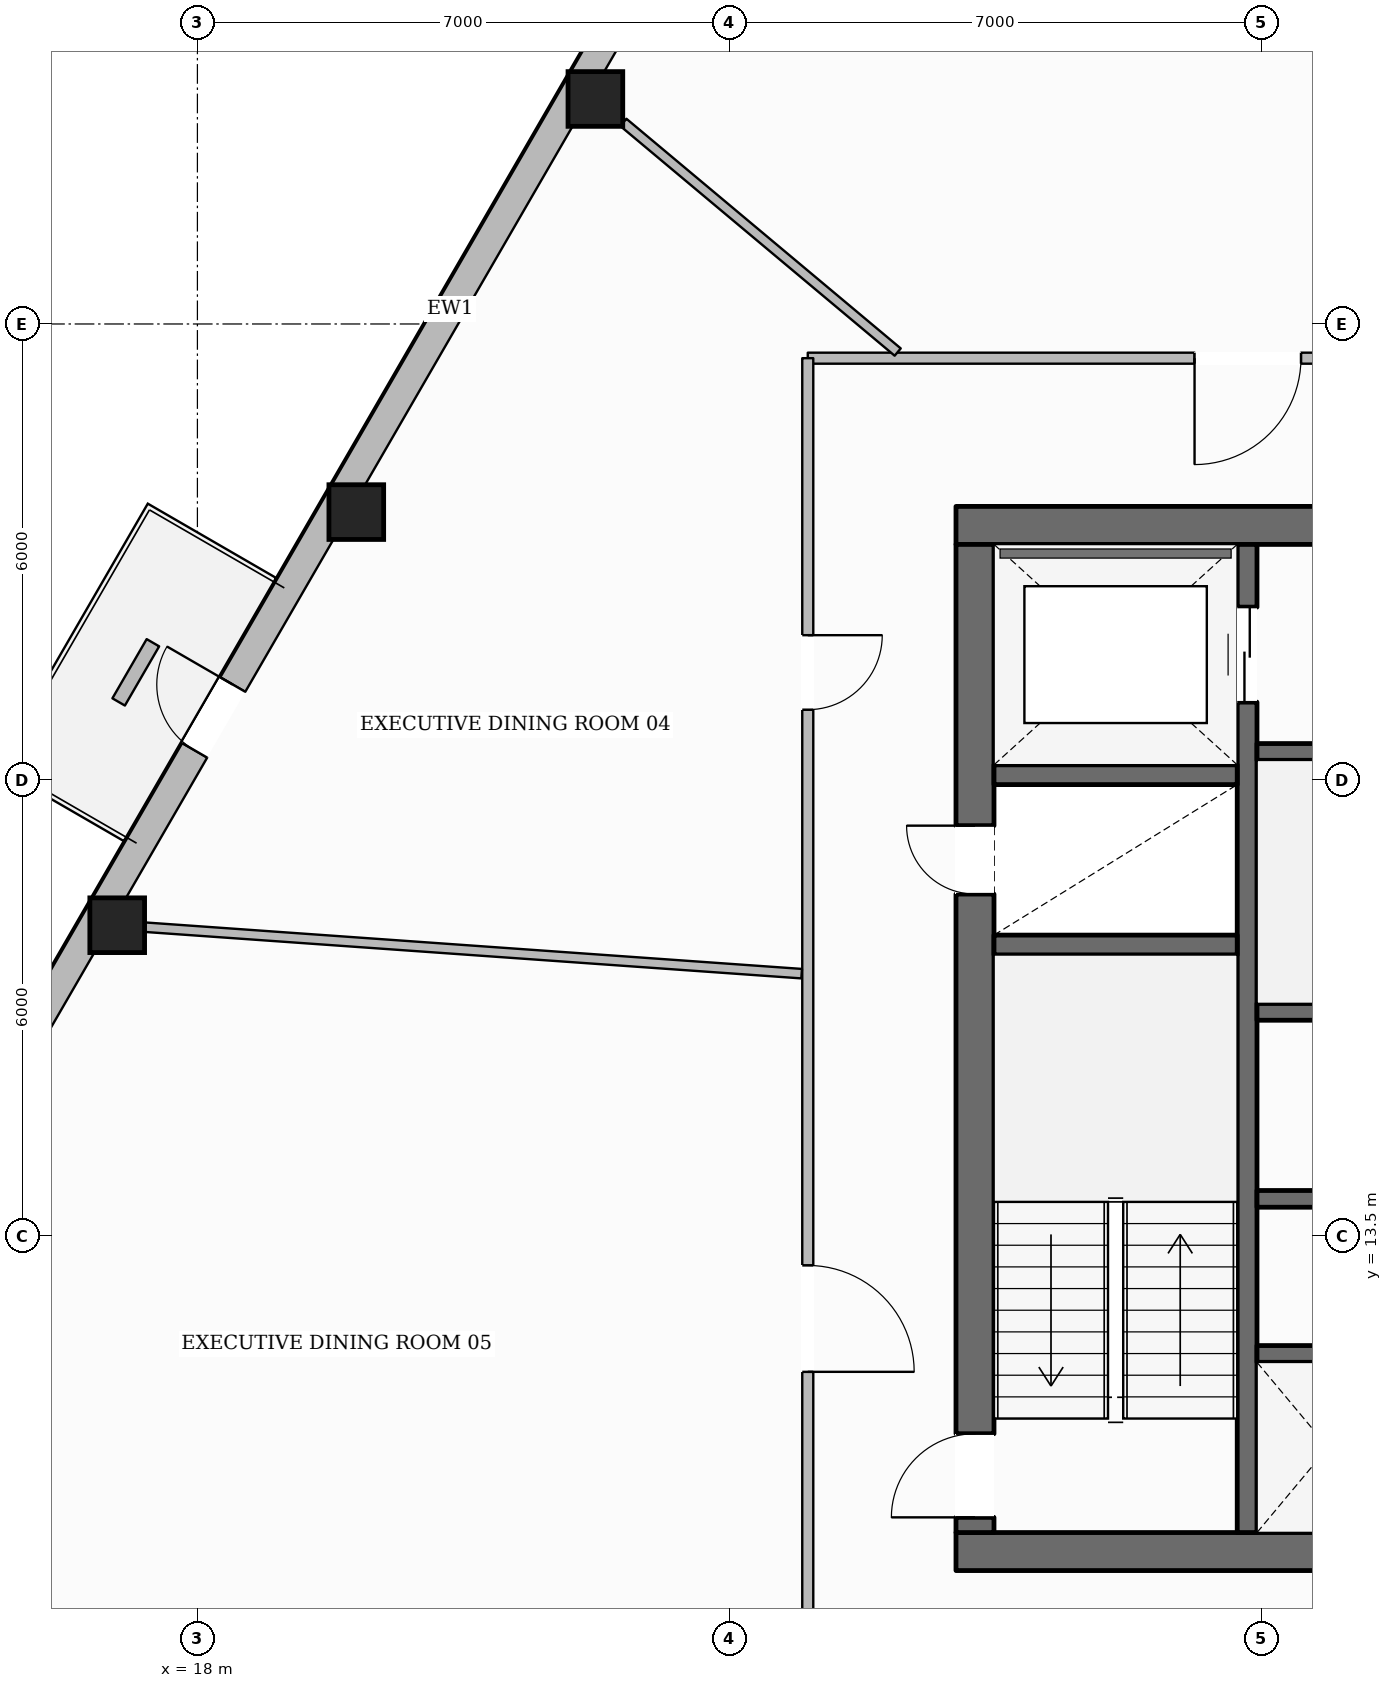
"""IFC4 building model, lengths in metres.
Left out: names, types, materials, properties, quantities, classifications, styles, units other than length and angle.
Written with IfcOpenShell. Run it as: python <this file> out.ifc"""

import sys

from ifc_helpers import new_model, si_unit, direction, frame, frame_2d, origin, origin_2d, place, context, subcontext, project, spatial, rectangle, hollow_rectangle, extrude, element, fill, save


model = new_model("IFC4")
c1 = context("Model", 3, precision=1e-05, world=origin(), true_north=direction((0.0, 1.0)))
c2 = subcontext(c1, "Body", "Model", "MODEL_VIEW")
j1 = project(units=[si_unit("LENGTHUNIT", "METRE"), si_unit("PLANEANGLEUNIT", "RADIAN")], contexts=[c1])
p1 = place(None, origin())
s1 = spatial("IfcSite", under=j1, at=p1, CompositionType="ELEMENT")
p2 = place(p1, origin())
s2 = spatial("IfcBuilding", under=s1, at=p2, CompositionType="ELEMENT")
p3 = place(p2, frame((0.0, 0.0, 150.95)))
s3 = spatial("IfcBuildingStorey", under=s2, at=p3, CompositionType="ELEMENT", Elevation=150.95)
p4 = place(p3, frame((27.98, 9.35, 0.0), z_axis=(0.0, 0.0, 1.0), x_axis=(1.0, 0.0, 0.0)))
e1 = element("IfcWall", 1, at=p4, inside=s3, PredefinedType="SOLIDWALL", context=c2, shape_type="SweptSolid", body=[
    extrude(rectangle(XDim=20.04, YDim=0.5, at=frame_2d((10.02, 0.0))), origin(), (0.0, 0.0, 1.0), 3.43),
])
p5 = place(p4, frame((10.52, 0.0, 0.0)))
e2 = element("IfcOpeningElement", 2, at=p5, cuts=e1, PredefinedType="OPENING", context=c2, shape_type="SweptSolid", body=[
    extrude(rectangle(XDim=1.4, YDim=2.2, at=frame_2d((0.7, 1.1))), frame((0.0, 0.26, 0.0), z_axis=(0.0, -1.0, 0.0), x_axis=(1.0, 0.0, 0.0)), (0.0, 0.0, 1.0), 0.52),
])
p6 = place(p3, frame((27.98, 22.85, 0.0), z_axis=(0.0, 0.0, 1.0), x_axis=(1.0, 0.0, 0.0)))
e3 = element("IfcWall", 3, at=p6, inside=s3, PredefinedType="SOLIDWALL", context=c2, shape_type="SweptSolid", body=[
    extrude(rectangle(XDim=20.04, YDim=0.5, at=frame_2d((10.02, 0.0))), origin(), (0.0, 0.0, 1.0), 3.43),
])
p7 = place(p6, frame((6.295, 0.0, 0.0)))
e4 = element("IfcOpeningElement", 4, at=p7, cuts=e3, PredefinedType="OPENING", context=c2, shape_type="SweptSolid", body=[
    extrude(rectangle(XDim=1.05, YDim=2.15, at=frame_2d((0.525, 1.075))), frame((0.0, 0.26, 0.0), z_axis=(0.0, -1.0, 0.0), x_axis=(1.0, 0.0, 0.0)), (0.0, 0.0, 1.0), 0.52),
])
p8 = place(p6, frame((12.695, 0.0, 0.0)))
e5 = element("IfcOpeningElement", 5, at=p8, cuts=e3, PredefinedType="OPENING", context=c2, shape_type="SweptSolid", body=[
    extrude(rectangle(XDim=1.05, YDim=2.15, at=frame_2d((0.525, 1.075))), frame((0.0, 0.26, 0.0), z_axis=(0.0, -1.0, 0.0), x_axis=(1.0, 0.0, 0.0)), (0.0, 0.0, 1.0), 0.52),
])
p9 = place(p3, frame((28.23, 9.6, 0.0), z_axis=(0.0, 0.0, 1.0), x_axis=(0.0, 1.0, 0.0)))
e6 = element("IfcWall", 6, at=p9, inside=s3, PredefinedType="SOLIDWALL", context=c2, shape_type="SweptSolid", body=[
    extrude(rectangle(XDim=13.0, YDim=0.5, at=frame_2d((6.5, 0.0))), origin(), (0.0, 0.0, 1.0), 3.43),
])
p10 = place(p9, frame((0.2, 0.0, 0.0)))
e7 = element("IfcOpeningElement", 7, at=p10, cuts=e6, PredefinedType="OPENING", context=c2, shape_type="SweptSolid", body=[
    extrude(rectangle(XDim=1.1, YDim=2.15, at=frame_2d((0.55, 1.075))), frame((0.0, 0.26, 0.0), z_axis=(0.0, -1.0, 0.0), x_axis=(1.0, 0.0, 0.0)), (0.0, 0.0, 1.0), 0.52),
])
p11 = place(p9, frame((8.4, 0.0, 0.0)))
e8 = element("IfcOpeningElement", 8, at=p11, cuts=e6, PredefinedType="OPENING", context=c2, shape_type="SweptSolid", body=[
    extrude(rectangle(XDim=0.9, YDim=2.1, at=frame_2d((0.45, 1.05))), frame((0.0, 0.26, 0.0), z_axis=(0.0, -1.0, 0.0), x_axis=(1.0, 0.0, 0.0)), (0.0, 0.0, 1.0), 0.52),
])
p12 = place(p3, frame((31.81, 9.6, 0.0), z_axis=(0.0, 0.0, 1.0), x_axis=(0.0, 1.0, 0.0)))
e9 = element("IfcWall", 9, at=p12, inside=s3, PredefinedType="SHEAR", context=c2, shape_type="SweptSolid", body=[
    extrude(rectangle(XDim=13.0, YDim=0.26, at=frame_2d((6.5, 0.0))), origin(), (0.0, 0.0, 1.0), 3.43),
])
p13 = place(p12, frame((10.925, 0.0, 0.0)))
e10 = element("IfcOpeningElement", 10, at=p13, cuts=e9, PredefinedType="OPENING", context=c2, shape_type="SweptSolid", body=[
    extrude(rectangle(XDim=1.25, YDim=2.25, at=frame_2d((0.625, 1.125))), frame((0.0, 0.14, 0.0), z_axis=(0.0, -1.0, 0.0), x_axis=(1.0, 0.0, 0.0)), (0.0, 0.0, 1.0), 0.28),
])
for number, where, z_axis, x_axis in (
    (11, (28.48, 17.33, 0.0), (0.0, 0.0, 1.0), (1.0, 0.0, 0.0)),
    (12, (28.48, 19.57, 0.0), (0.0, 0.0, 1.0), (1.0, 0.0, 0.0)),
):
    element("IfcWall", number, at=place(p3, frame(where, z_axis=z_axis, x_axis=x_axis)), inside=s3, PredefinedType="SHEAR", context=c2, shape_type="SweptSolid", body=[
        extrude(rectangle(XDim=3.2, YDim=0.26, at=frame_2d((1.6, 0.0))), origin(), (0.0, 0.0, 1.0), 3.43),
    ])
p14 = place(p3, frame((31.94, 19.87, 0.0), z_axis=(0.0, 0.0, 1.0), x_axis=(1.0, 0.0, 0.0)))
e13 = element("IfcWall", 13, at=p14, inside=s3, PredefinedType="SOLIDWALL", context=c2, shape_type="SweptSolid", body=[
    extrude(rectangle(XDim=12.12, YDim=0.22, at=frame_2d((6.06, 0.0))), origin(), (0.0, 0.0, 1.0), 3.43),
])
p15 = place(p14, frame((6.3, 0.0, 0.0)))
e14 = element("IfcOpeningElement", 14, at=p15, cuts=e13, PredefinedType="OPENING", context=c2, shape_type="SweptSolid", body=[
    extrude(rectangle(XDim=1.1, YDim=2.15, at=frame_2d((0.55, 1.075))), frame((0.0, 0.12, 0.0), z_axis=(0.0, -1.0, 0.0), x_axis=(1.0, 0.0, 0.0)), (0.0, 0.0, 1.0), 0.24),
])
p16 = place(p14, frame((8.01, 0.0, 0.0)))
e15 = element("IfcOpeningElement", 15, at=p16, cuts=e13, PredefinedType="OPENING", context=c2, shape_type="SweptSolid", body=[
    extrude(rectangle(XDim=0.9, YDim=2.1, at=frame_2d((0.45, 1.05))), frame((0.0, 0.12, 0.0), z_axis=(0.0, -1.0, 0.0), x_axis=(1.0, 0.0, 0.0)), (0.0, 0.0, 1.0), 0.24),
])
p17 = place(p14, frame((10.21, 0.0, 0.0)))
e16 = element("IfcOpeningElement", 16, at=p17, cuts=e13, PredefinedType="OPENING", context=c2, shape_type="SweptSolid", body=[
    extrude(rectangle(XDim=0.9, YDim=2.1, at=frame_2d((0.45, 1.05))), frame((0.0, 0.12, 0.0), z_axis=(0.0, -1.0, 0.0), x_axis=(1.0, 0.0, 0.0)), (0.0, 0.0, 1.0), 0.24),
])
p18 = place(p3, frame((31.94, 16.45, 0.0), z_axis=(0.0, 0.0, 1.0), x_axis=(1.0, 0.0, 0.0)))
e17 = element("IfcWall", 17, at=p18, inside=s3, PredefinedType="SOLIDWALL", context=c2, shape_type="SweptSolid", body=[
    extrude(rectangle(XDim=12.12, YDim=0.22, at=frame_2d((6.06, 0.0))), origin(), (0.0, 0.0, 1.0), 3.43),
])
p19 = place(p3, frame((31.94, 13.99, 0.0), z_axis=(0.0, 0.0, 1.0), x_axis=(1.0, 0.0, 0.0)))
e18 = element("IfcWall", 18, at=p19, inside=s3, PredefinedType="SOLIDWALL", context=c2, shape_type="SweptSolid", body=[
    extrude(rectangle(XDim=12.12, YDim=0.22, at=frame_2d((6.06, 0.0))), origin(), (0.0, 0.0, 1.0), 3.43),
])
p20 = place(p19, frame((2.51, 0.0, 0.0)))
e19 = element("IfcOpeningElement", 19, at=p20, cuts=e18, PredefinedType="OPENING", context=c2, shape_type="SweptSolid", body=[
    extrude(rectangle(XDim=0.9, YDim=2.1, at=frame_2d((0.45, 1.05))), frame((0.0, 0.12, 0.0), z_axis=(0.0, -1.0, 0.0), x_axis=(1.0, 0.0, 0.0)), (0.0, 0.0, 1.0), 0.24),
])
p21 = place(p19, frame((6.535, 0.0, 0.0)))
e20 = element("IfcOpeningElement", 20, at=p21, cuts=e18, PredefinedType="OPENING", context=c2, shape_type="SweptSolid", body=[
    extrude(rectangle(XDim=1.1, YDim=2.2, at=frame_2d((0.55, 1.1))), frame((0.0, 0.12, 0.0), z_axis=(0.0, -1.0, 0.0), x_axis=(1.0, 0.0, 0.0)), (0.0, 0.0, 1.0), 0.24),
])
p22 = place(p19, frame((8.585, 0.0, 0.0)))
e21 = element("IfcOpeningElement", 21, at=p22, cuts=e18, PredefinedType="OPENING", context=c2, shape_type="SweptSolid", body=[
    extrude(rectangle(XDim=1.1, YDim=2.2, at=frame_2d((0.55, 1.1))), frame((0.0, 0.12, 0.0), z_axis=(0.0, -1.0, 0.0), x_axis=(1.0, 0.0, 0.0)), (0.0, 0.0, 1.0), 0.24),
])
p23 = place(p19, frame((10.635, 0.0, 0.0)))
e22 = element("IfcOpeningElement", 22, at=p23, cuts=e18, PredefinedType="OPENING", context=c2, shape_type="SweptSolid", body=[
    extrude(rectangle(XDim=1.1, YDim=2.2, at=frame_2d((0.55, 1.1))), frame((0.0, 0.12, 0.0), z_axis=(0.0, -1.0, 0.0), x_axis=(1.0, 0.0, 0.0)), (0.0, 0.0, 1.0), 0.24),
])
p24 = place(p3, frame((31.94, 11.95, 0.0), z_axis=(0.0, 0.0, 1.0), x_axis=(1.0, 0.0, 0.0)))
e23 = element("IfcWall", 23, at=p24, inside=s3, PredefinedType="SOLIDWALL", context=c2, shape_type="SweptSolid", body=[
    extrude(rectangle(XDim=6.19, YDim=0.22, at=frame_2d((3.095, 0.0))), origin(), (0.0, 0.0, 1.0), 3.43),
])
for number, where, z_axis, x_axis in (
    (24, (23.236, 28.46, 0.0), (0.0, 0.0, 1.0), (1.0, 0.0, 0.0)),
    (25, (20.09, 23.025, 0.0), (0.0, 0.0, 1.0), (1.0, 0.0, 0.0)),
    (26, (16.945, 17.59, 0.0), (0.0, 0.0, 1.0), (1.0, 0.0, 0.0)),
):
    element("IfcColumn", number, at=place(p3, frame(where, z_axis=z_axis, x_axis=x_axis)), inside=s3, PredefinedType="COLUMN", context=c2, shape_type="SweptSolid", body=[
        extrude(hollow_rectangle(XDim=0.72, YDim=0.72, WallThickness=0.032, at=origin_2d()), origin(), (0.0, 0.0, 1.0), 3.43),
    ])
p25 = place(p3, frame((13.327, 11.879, 0.0), z_axis=(0.0, 0.0, 1.0), x_axis=(0.500913687278, 0.865497243148, 0.0)))
e27 = element("IfcWall", 27, at=p25, inside=s3, PredefinedType="STANDARD", context=c2, shape_type="SweptSolid", body=[
    extrude(rectangle(XDim=38.628, YDim=0.38, at=frame_2d((19.314, 0.0))), origin(), (0.0, 0.0, 1.0), 2.889),
])
p26 = place(p25, frame((9.257, 0.0, 0.0)))
e28 = element("IfcOpeningElement", 28, at=p26, cuts=e27, PredefinedType="OPENING", context=c2, shape_type="SweptSolid", body=[
    extrude(rectangle(XDim=1.0, YDim=2.2, at=frame_2d((0.5, 1.1))), frame((0.0, 0.2, 0.0), z_axis=(0.0, -1.0, 0.0), x_axis=(1.0, 0.0, 0.0)), (0.0, 0.0, 1.0), 0.4),
])
p27 = place(p25, frame((34.239, 0.0, 0.55)))
e29 = element("IfcOpeningElement", 29, at=p27, cuts=e27, PredefinedType="OPENING", context=c2, shape_type="SweptSolid", body=[
    extrude(rectangle(XDim=1.55, YDim=1.6, at=frame_2d((0.775, 0.8))), frame((0.0, 0.2, 0.0), z_axis=(0.0, -1.0, 0.0), x_axis=(1.0, 0.0, 0.0)), (0.0, 0.0, 1.0), 0.4),
])
p28 = place(p25, frame((27.959, 0.0, 0.55)))
e30 = element("IfcOpeningElement", 30, at=p28, cuts=e27, PredefinedType="OPENING", context=c2, shape_type="SweptSolid", body=[
    extrude(rectangle(XDim=1.55, YDim=1.6, at=frame_2d((0.775, 0.8))), frame((0.0, 0.2, 0.0), z_axis=(0.0, -1.0, 0.0), x_axis=(1.0, 0.0, 0.0)), (0.0, 0.0, 1.0), 0.4),
])
p29 = place(p25, frame((21.679, 0.0, 0.55)))
e31 = element("IfcOpeningElement", 31, at=p29, cuts=e27, PredefinedType="OPENING", context=c2, shape_type="SweptSolid", body=[
    extrude(rectangle(XDim=1.55, YDim=1.6, at=frame_2d((0.775, 0.8))), frame((0.0, 0.2, 0.0), z_axis=(0.0, -1.0, 0.0), x_axis=(1.0, 0.0, 0.0)), (0.0, 0.0, 1.0), 0.4),
])
p30 = place(p25, frame((2.84, 0.0, 0.55)))
e32 = element("IfcOpeningElement", 32, at=p30, cuts=e27, PredefinedType="OPENING", context=c2, shape_type="SweptSolid", body=[
    extrude(rectangle(XDim=1.55, YDim=1.6, at=frame_2d((0.775, 0.8))), frame((0.0, 0.2, 0.0), z_axis=(0.0, -1.0, 0.0), x_axis=(1.0, 0.0, 0.0)), (0.0, 0.0, 1.0), 0.4),
])
p31 = place(p3, frame((18.988, 2.486, 0.0), z_axis=(0.0, 0.0, 1.0), x_axis=(-0.494355320485, 0.869259924941, 0.0)))
e33 = element("IfcWall", 33, at=p31, inside=s3, PredefinedType="STANDARD", context=c2, shape_type="SweptSolid", body=[
    extrude(rectangle(XDim=11.446, YDim=0.3, at=frame_2d((5.723, 0.0))), origin(), (0.0, 0.0, 1.0), 2.889),
])
p32 = place(p31, frame((5.123, 0.0, 0.65)))
e34 = element("IfcOpeningElement", 34, at=p32, cuts=e33, PredefinedType="OPENING", context=c2, shape_type="SweptSolid", body=[
    extrude(rectangle(XDim=1.2, YDim=1.55, at=frame_2d((0.6, 0.775))), frame((0.0, 0.16, 0.0), z_axis=(0.0, -1.0, 0.0), x_axis=(1.0, 0.0, 0.0)), (0.0, 0.0, 1.0), 0.32),
])
p33 = place(p3, frame((17.415, 21.306, 0.0), z_axis=(0.0, 0.0, 1.0), x_axis=(-0.501068351936, -0.865407711248, 0.0)))
e35 = element("IfcWall", 35, at=p33, inside=s3, PredefinedType="USERDEFINED", context=c2, shape_type="SweptSolid", body=[
    extrude(rectangle(XDim=0.9, YDim=0.19, at=frame_2d((0.45, 0.0))), origin(), (0.0, 0.0, 1.0), 0.5),
])
p34 = place(p3, frame((49.97, 25.05, 0.0), z_axis=(0.0, 0.0, 1.0), x_axis=(-1.0, 0.0, 0.0)))
e36 = element("IfcWall", 36, at=p34, inside=s3, PredefinedType="PARTITIONING", context=c2, shape_type="SweptSolid", body=[
    extrude(rectangle(XDim=23.94, YDim=0.145, at=frame_2d((11.97, 0.0))), origin(), (0.0, 0.0, 1.0), 3.43),
])
p35 = place(p34, frame((2.536, 0.0, 0.0)))
e37 = element("IfcOpeningElement", 37, at=p35, cuts=e36, PredefinedType="OPENING", context=c2, shape_type="SweptSolid", body=[
    extrude(rectangle(XDim=0.98, YDim=2.15, at=frame_2d((0.49, 1.075))), frame((0.0, 0.083, 0.0), z_axis=(0.0, -1.0, 0.0), x_axis=(1.0, 0.0, 0.0)), (0.0, 0.0, 1.0), 0.165),
])
p36 = place(p34, frame((9.289, 0.0, 0.0)))
e38 = element("IfcOpeningElement", 38, at=p36, cuts=e36, PredefinedType="OPENING", context=c2, shape_type="SweptSolid", body=[
    extrude(rectangle(XDim=1.4, YDim=2.2, at=frame_2d((0.7, 1.1))), frame((0.0, 0.083, 0.0), z_axis=(0.0, -1.0, 0.0), x_axis=(1.0, 0.0, 0.0)), (0.0, 0.0, 1.0), 0.165),
])
p37 = place(p34, frame((17.451, 0.0, 0.0)))
e39 = element("IfcOpeningElement", 39, at=p37, cuts=e36, PredefinedType="OPENING", context=c2, shape_type="SweptSolid", body=[
    extrude(rectangle(XDim=1.4, YDim=2.2, at=frame_2d((0.7, 1.1))), frame((0.0, 0.083, 0.0), z_axis=(0.0, -1.0, 0.0), x_axis=(1.0, 0.0, 0.0)), (0.0, 0.0, 1.0), 0.165),
])
p38 = place(p3, frame((26.03, 25.05, 0.0), z_axis=(0.0, 0.0, 1.0), x_axis=(0.0, -1.0, 0.0)))
e40 = element("IfcWall", 40, at=p38, inside=s3, PredefinedType="PARTITIONING", context=c2, shape_type="SweptSolid", body=[
    extrude(rectangle(XDim=17.9, YDim=0.145, at=frame_2d((8.95, 0.0))), origin(), (0.0, 0.0, 1.0), 3.118),
])
p39 = place(p38, frame((3.644, 0.0, 0.0)))
e41 = element("IfcOpeningElement", 41, at=p39, cuts=e40, PredefinedType="OPENING", context=c2, shape_type="SweptSolid", body=[
    extrude(rectangle(XDim=0.98, YDim=2.15, at=frame_2d((0.49, 1.075))), frame((0.0, 0.083, 0.0), z_axis=(0.0, -1.0, 0.0), x_axis=(1.0, 0.0, 0.0)), (0.0, 0.0, 1.0), 0.165),
])
p40 = place(p38, frame((11.936, 0.0, 0.0)))
e42 = element("IfcOpeningElement", 42, at=p40, cuts=e40, PredefinedType="OPENING", context=c2, shape_type="SweptSolid", body=[
    extrude(rectangle(XDim=1.4, YDim=2.2, at=frame_2d((0.7, 1.1))), frame((0.0, 0.083, 0.0), z_axis=(0.0, -1.0, 0.0), x_axis=(1.0, 0.0, 0.0)), (0.0, 0.0, 1.0), 0.165),
])
p41 = place(p3, frame((36.322, 25.131, 0.0), z_axis=(0.0, 0.0, 1.0), x_axis=(-0.182723840281, 0.983164278335, 0.0)))
e43 = element("IfcWall", 43, at=p41, inside=s3, PredefinedType="PARTITIONING", context=c2, shape_type="SweptSolid", body=[
    extrude(rectangle(XDim=19.617, YDim=0.125, at=frame_2d((9.809, 0.0))), origin(), (0.0, 0.0, 1.0), 2.971),
])
p42 = place(p3, frame((27.213, 25.131, 0.0), z_axis=(0.0, 0.0, 1.0), x_axis=(-0.766769547329, 0.641922472958, 0.0)))
e44 = element("IfcWall", 44, at=p42, inside=s3, PredefinedType="PARTITIONING", context=c2, shape_type="SweptSolid", body=[
    extrude(rectangle(XDim=4.707, YDim=0.125, at=frame_2d((2.354, 0.0))), origin(), (0.0, 0.0, 1.0), 2.971),
])
p43 = place(p3, frame((25.949, 16.953, 0.0), z_axis=(0.0, 0.0, 1.0), x_axis=(-0.997506141345, 0.070579727824, 0.0)))
e45 = element("IfcWall", 45, at=p43, inside=s3, PredefinedType="PARTITIONING", context=c2, shape_type="SweptSolid", body=[
    extrude(rectangle(XDim=8.658, YDim=0.125, at=frame_2d((4.329, 0.0))), origin(), (0.0, 0.0, 1.0), 2.971),
])
p44 = place(p26, origin())
e46 = element("IfcDoor", 46, at=p44, inside=s3, OperationType="SINGLE_SWING_RIGHT", PredefinedType="DOOR", context=c2, shape_type="SweptSolid", body=[
    extrude(rectangle(XDim=1.0, YDim=2.2, at=frame_2d((0.5, 1.1))), frame((0.0, 0.025, 0.0), z_axis=(0.0, -1.0, 0.0), x_axis=(1.0, 0.0, 0.0)), (0.0, 0.0, 1.0), 0.05),
])
fill(e28, e46)
p45 = place(p10, origin())
e47 = element("IfcDoor", 47, at=p45, inside=s3, OperationType="SINGLE_SWING_LEFT", PredefinedType="DOOR", context=c2, shape_type="SweptSolid", body=[
    extrude(rectangle(XDim=1.1, YDim=2.15, at=frame_2d((0.55, 1.075))), frame((0.0, 0.025, 0.0), z_axis=(0.0, -1.0, 0.0), x_axis=(1.0, 0.0, 0.0)), (0.0, 0.0, 1.0), 0.05),
])
fill(e7, e47)
p46 = place(p11, origin())
e48 = element("IfcDoor", 48, at=p46, inside=s3, OperationType="SINGLE_SWING_RIGHT", PredefinedType="DOOR", context=c2, shape_type="SweptSolid", body=[
    extrude(rectangle(XDim=0.9, YDim=2.1, at=frame_2d((0.45, 1.05))), frame((0.0, 0.025, 0.0), z_axis=(0.0, -1.0, 0.0), x_axis=(1.0, 0.0, 0.0)), (0.0, 0.0, 1.0), 0.05),
])
fill(e8, e48)
p47 = place(p13, origin())
e49 = element("IfcDoor", 49, at=p47, inside=s3, OperationType="DOUBLE_DOOR_SLIDING", PredefinedType="DOOR", context=c2, shape_type="SweptSolid", body=[
    extrude(rectangle(XDim=1.25, YDim=2.25, at=frame_2d((0.625, 1.125))), frame((0.0, 0.025, 0.0), z_axis=(0.0, -1.0, 0.0), x_axis=(1.0, 0.0, 0.0)), (0.0, 0.0, 1.0), 0.05),
])
fill(e10, e49)
p48 = place(p37, origin())
e50 = element("IfcDoor", 50, at=p48, inside=s3, OperationType="SINGLE_SWING_RIGHT", PredefinedType="DOOR", context=c2, shape_type="SweptSolid", body=[
    extrude(rectangle(XDim=1.4, YDim=2.2, at=frame_2d((0.7, 1.1))), frame((0.0, 0.025, 0.0), z_axis=(0.0, -1.0, 0.0), x_axis=(1.0, 0.0, 0.0)), (0.0, 0.0, 1.0), 0.05),
])
fill(e39, e50)
p49 = place(p39, origin())
e51 = element("IfcDoor", 51, at=p49, inside=s3, OperationType="SINGLE_SWING_LEFT", PredefinedType="DOOR", context=c2, shape_type="SweptSolid", body=[
    extrude(rectangle(XDim=0.98, YDim=2.15, at=frame_2d((0.49, 1.075))), frame((0.0, 0.025, 0.0), z_axis=(0.0, -1.0, 0.0), x_axis=(1.0, 0.0, 0.0)), (0.0, 0.0, 1.0), 0.05),
])
fill(e41, e51)
p50 = place(p40, origin())
e52 = element("IfcDoor", 52, at=p50, inside=s3, OperationType="SINGLE_SWING_RIGHT", PredefinedType="DOOR", context=c2, shape_type="SweptSolid", body=[
    extrude(rectangle(XDim=1.4, YDim=2.2, at=frame_2d((0.7, 1.1))), frame((0.0, 0.025, 0.0), z_axis=(0.0, -1.0, 0.0), x_axis=(1.0, 0.0, 0.0)), (0.0, 0.0, 1.0), 0.05),
])
fill(e42, e52)
save(model, sys.argv[1])
